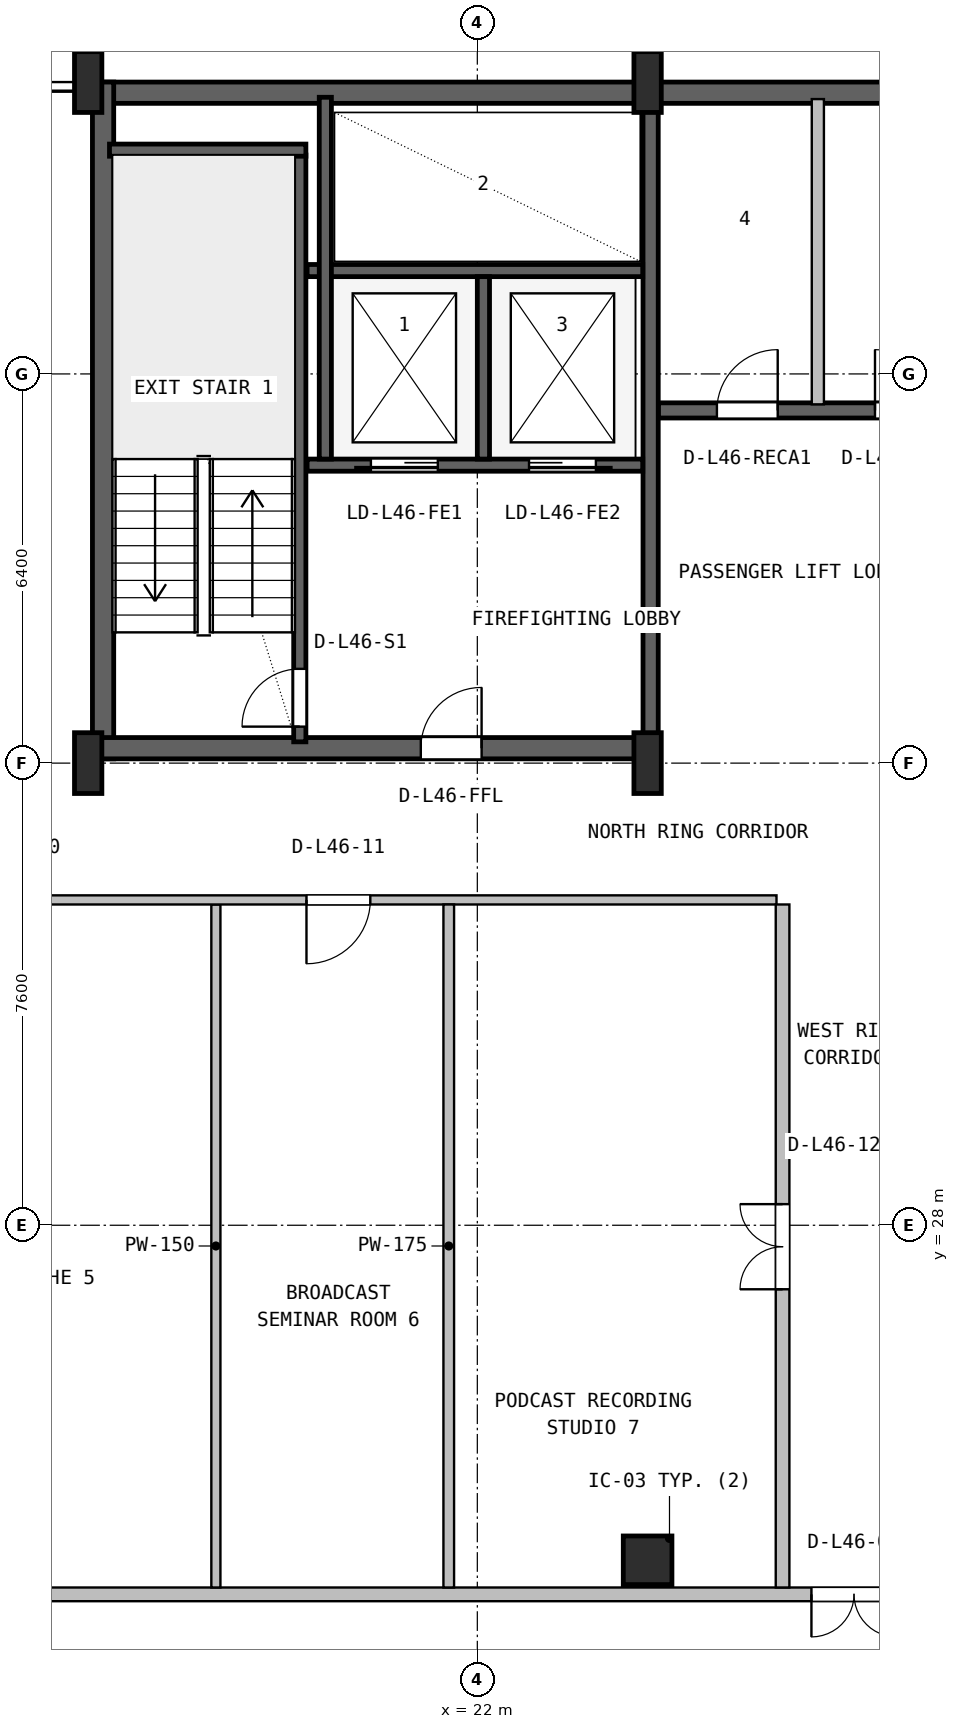
"""IFC4 building model, lengths in metres.
Left out: names, types, materials, properties, quantities, classifications, styles, units other than length and angle.
Written with IfcOpenShell. Run it as: python <this file> out.ifc"""

import sys

from ifc_helpers import new_model, si_unit, direction, frame, frame_2d, origin, origin_2d, place, context, subcontext, project, spatial, rectangle, i_section, extrude, source, transform, mapped, element, fill, save


model = new_model("IFC4")
c1 = context("Model", 3, precision=1e-05, world=origin(), true_north=direction((0.0, 1.0)))
c2 = subcontext(c1, "Body", "Model", "MODEL_VIEW")
j1 = project(units=[si_unit("LENGTHUNIT", "METRE"), si_unit("PLANEANGLEUNIT", "RADIAN")], contexts=[c1])
p1 = place(None, origin())
s1 = spatial("IfcSite", under=j1, at=p1, CompositionType="ELEMENT")
p2 = place(p1, origin())
s2 = spatial("IfcBuilding", under=s1, at=p2, CompositionType="ELEMENT")
p3 = place(p2, frame((0.0, 0.0, 187.6)))
s3 = spatial("IfcBuildingStorey", under=s2, at=p3, CompositionType="ELEMENT", Elevation=187.6)
p4 = place(p3, frame((15.6, 46.625, 0.0), z_axis=(0.0, 0.0, 1.0), x_axis=(1.0, 0.0, 0.0)))
e1 = element("IfcWall", 1, at=p4, inside=s3, PredefinedType="SHEAR", context=c2, shape_type="SweptSolid", body=[
    extrude(rectangle(XDim=36.8, YDim=0.35, at=frame_2d((18.4, 0.0))), origin(), (0.0, 0.0, 1.0), 3.52),
])
p5 = place(p3, frame((15.845, 35.67, 0.0), z_axis=(0.0, 0.0, 1.0), x_axis=(0.0, 1.0, 0.0)))
e2 = element("IfcWall", 2, at=p5, inside=s3, PredefinedType="SHEAR", context=c2, shape_type="SweptSolid", body=[
    extrude(rectangle(XDim=11.13, YDim=0.35, at=frame_2d((5.565, 0.0))), origin(), (0.0, 0.0, 1.0), 3.52),
])
p6 = place(p3, frame((15.67, 35.845, 0.0), z_axis=(0.0, 0.0, 1.0), x_axis=(1.0, 0.0, 0.0)))
e3 = element("IfcWall", 3, at=p6, inside=s3, PredefinedType="SHEAR", context=c2, shape_type="SweptSolid", body=[
    extrude(rectangle(XDim=9.13, YDim=0.35, at=frame_2d((4.565, 0.0))), origin(), (0.0, 0.0, 1.0), 3.52),
])
p7 = place(p6, frame((5.4, 0.0, 0.0)))
e4 = element("IfcOpeningElement", 4, at=p7, cuts=e3, PredefinedType="OPENING", context=c2, shape_type="SweptSolid", body=[
    extrude(rectangle(XDim=1.0, YDim=2.1, at=frame_2d((0.5, 1.05))), frame((0.0, 0.185, 0.0), z_axis=(0.0, -1.0, 0.0), x_axis=(1.0, 0.0, 0.0)), (0.0, 0.0, 1.0), 0.37),
])
m1 = source(origin(), c2, "Body", "SweptSolid", [
    extrude(i_section(OverallWidth=0.45, OverallDepth=1.0, WebThickness=0.016, FlangeThickness=0.03, FilletRadius=0.016, at=origin_2d()), origin(), (0.0, 0.0, 1.0), 3.8),
])
for number, where, z_axis, x_axis in (
    (5, (15.6, 35.6, 0.0), (0.0, 0.0, 1.0), (1.0, 0.0, 0.0)),
    (6, (15.6, 46.8, 0.0), (0.0, 0.0, 1.0), (1.0, 0.0, 0.0)),
    (7, (24.8, 35.6, 0.0), (0.0, 0.0, 1.0), (1.0, 0.0, 0.0)),
    (8, (24.8, 46.8, 0.0), (0.0, 0.0, 1.0), (1.0, 0.0, 0.0)),
):
    element("IfcColumn", number, at=place(p3, frame(where, z_axis=z_axis, x_axis=x_axis)), inside=s3, PredefinedType="COLUMN", context=c2, shape_type="MappedRepresentation", body=[
        mapped(m1, transform((0.0, 0.0, 0.0), x_axis=(1.0, 0.0, 0.0), y_axis=(0.0, 1.0, 0.0), z_axis=(0.0, 0.0, 1.0), scale=1.0)),
    ])
m2 = source(origin(), c2, "Body", "SweptSolid", [
    extrude(rectangle(XDim=0.8, YDim=0.8, at=origin_2d()), origin(), (0.0, 0.0, 1.0), 3.8),
])
p8 = place(p3, frame((24.8, 22.49, 0.0), z_axis=(0.0, 0.0, 1.0), x_axis=(1.0, 0.0, 0.0)))
e9 = element("IfcColumn", 9, at=p8, inside=s3, PredefinedType="COLUMN", context=c2, shape_type="MappedRepresentation", body=[
    mapped(m2, transform((0.0, 0.0, 0.0), x_axis=(1.0, 0.0, 0.0), y_axis=(0.0, 1.0, 0.0), z_axis=(0.0, 0.0, 1.0), scale=1.0)),
])
p9 = place(p3, frame((19.08, 35.95, 0.0), z_axis=(0.0, 0.0, 1.0), x_axis=(0.0, 1.0, 0.0)))
e10 = element("IfcWall", 10, at=p9, inside=s3, PredefinedType="SHEAR", context=c2, shape_type="SweptSolid", body=[
    extrude(rectangle(XDim=9.65, YDim=0.2, at=frame_2d((4.825, 0.0))), origin(), (0.0, 0.0, 1.0), 3.52),
])
p10 = place(p9, frame((0.25, 0.0, 0.0)))
e11 = element("IfcOpeningElement", 11, at=p10, cuts=e10, PredefinedType="OPENING", context=c2, shape_type="SweptSolid", body=[
    extrude(rectangle(XDim=0.95, YDim=2.1, at=frame_2d((0.475, 1.05))), frame((0.0, 0.11, 0.0), z_axis=(0.0, -1.0, 0.0), x_axis=(1.0, 0.0, 0.0)), (0.0, 0.0, 1.0), 0.22),
])
p11 = place(p3, frame((15.95, 45.68, 0.0), z_axis=(0.0, 0.0, 1.0), x_axis=(1.0, 0.0, 0.0)))
e12 = element("IfcWall", 12, at=p11, inside=s3, PredefinedType="SHEAR", context=c2, shape_type="SweptSolid", body=[
    extrude(rectangle(XDim=3.23, YDim=0.2, at=frame_2d((1.615, 0.0))), origin(), (0.0, 0.0, 1.0), 3.52),
])
p12 = place(p3, frame((24.85, 36.05, 0.0), z_axis=(0.0, 0.0, 1.0), x_axis=(0.0, 1.0, 0.0)))
e13 = element("IfcWall", 13, at=p12, inside=s3, PredefinedType="SHEAR", context=c2, shape_type="SweptSolid", body=[
    extrude(rectangle(XDim=10.45, YDim=0.25, at=frame_2d((5.225, 0.0))), origin(), (0.0, 0.0, 1.0), 3.52),
])
p13 = place(p3, frame((19.2, 40.5, 0.0), z_axis=(0.0, 0.0, 1.0), x_axis=(1.0, 0.0, 0.0)))
e14 = element("IfcWall", 14, at=p13, inside=s3, PredefinedType="SHEAR", context=c2, shape_type="SweptSolid", body=[
    extrude(rectangle(XDim=5.52, YDim=0.2, at=frame_2d((2.76, 0.0))), origin(), (0.0, 0.0, 1.0), 3.52),
])
p14 = place(p13, frame((1.05, 0.0, 0.0)))
e15 = element("IfcOpeningElement", 15, at=p14, cuts=e14, PredefinedType="OPENING", context=c2, shape_type="SweptSolid", body=[
    extrude(rectangle(XDim=1.1, YDim=2.18, at=frame_2d((0.55, 1.09))), frame((0.0, 0.11, 0.0), z_axis=(0.0, -1.0, 0.0), x_axis=(1.0, 0.0, 0.0)), (0.0, 0.0, 1.0), 0.22),
])
p15 = place(p13, frame((3.65, 0.0, 0.0)))
e16 = element("IfcOpeningElement", 16, at=p15, cuts=e14, PredefinedType="OPENING", context=c2, shape_type="SweptSolid", body=[
    extrude(rectangle(XDim=1.1, YDim=2.18, at=frame_2d((0.55, 1.09))), frame((0.0, 0.11, 0.0), z_axis=(0.0, -1.0, 0.0), x_axis=(1.0, 0.0, 0.0)), (0.0, 0.0, 1.0), 0.22),
])
p16 = place(p3, frame((19.2, 43.7, 0.0), z_axis=(0.0, 0.0, 1.0), x_axis=(1.0, 0.0, 0.0)))
e17 = element("IfcWall", 17, at=p16, inside=s3, PredefinedType="SHEAR", context=c2, shape_type="SweptSolid", body=[
    extrude(rectangle(XDim=5.52, YDim=0.2, at=frame_2d((2.76, 0.0))), origin(), (0.0, 0.0, 1.0), 3.52),
])
p17 = place(p3, frame((22.1, 40.6, 0.0), z_axis=(0.0, 0.0, 1.0), x_axis=(0.0, 1.0, 0.0)))
e18 = element("IfcWall", 18, at=p17, inside=s3, PredefinedType="SHEAR", context=c2, shape_type="SweptSolid", body=[
    extrude(rectangle(XDim=3.0, YDim=0.2, at=frame_2d((1.5, 0.0))), origin(), (0.0, 0.0, 1.0), 3.52),
])
p18 = place(p3, frame((19.5, 40.6, 0.0), z_axis=(0.0, 0.0, 1.0), x_axis=(0.0, 1.0, 0.0)))
e19 = element("IfcWall", 19, at=p18, inside=s3, PredefinedType="SHEAR", context=c2, shape_type="SweptSolid", body=[
    extrude(rectangle(XDim=5.95, YDim=0.2, at=frame_2d((2.975, 0.0))), origin(), (0.0, 0.0, 1.0), 3.52),
])
p19 = place(p3, frame((24.98, 41.4, 0.0), z_axis=(0.0, 0.0, 1.0), x_axis=(1.0, 0.0, 0.0)))
e20 = element("IfcWall", 20, at=p19, inside=s3, PredefinedType="SHEAR", context=c2, shape_type="SweptSolid", body=[
    extrude(rectangle(XDim=23.82, YDim=0.25, at=frame_2d((11.91, 0.0))), origin(), (0.0, 0.0, 1.0), 3.52),
])
p20 = place(p19, frame((8.87, 0.0, 0.0)))
e21 = element("IfcOpeningElement", 21, at=p20, cuts=e20, PredefinedType="OPENING", context=c2, shape_type="SweptSolid", body=[
    extrude(rectangle(XDim=1.1, YDim=2.18, at=frame_2d((0.55, 1.09))), frame((0.0, 0.135, 0.0), z_axis=(0.0, -1.0, 0.0), x_axis=(1.0, 0.0, 0.0)), (0.0, 0.0, 1.0), 0.27),
])
p21 = place(p19, frame((11.47, 0.0, 0.0)))
e22 = element("IfcOpeningElement", 22, at=p21, cuts=e20, PredefinedType="OPENING", context=c2, shape_type="SweptSolid", body=[
    extrude(rectangle(XDim=1.1, YDim=2.18, at=frame_2d((0.55, 1.09))), frame((0.0, 0.135, 0.0), z_axis=(0.0, -1.0, 0.0), x_axis=(1.0, 0.0, 0.0)), (0.0, 0.0, 1.0), 0.27),
])
p22 = place(p19, frame((14.07, 0.0, 0.0)))
e23 = element("IfcOpeningElement", 23, at=p22, cuts=e20, PredefinedType="OPENING", context=c2, shape_type="SweptSolid", body=[
    extrude(rectangle(XDim=1.1, YDim=2.18, at=frame_2d((0.55, 1.09))), frame((0.0, 0.135, 0.0), z_axis=(0.0, -1.0, 0.0), x_axis=(1.0, 0.0, 0.0)), (0.0, 0.0, 1.0), 0.27),
])
p23 = place(p19, frame((0.96, 0.0, 0.0)))
e24 = element("IfcOpeningElement", 24, at=p23, cuts=e20, PredefinedType="OPENING", context=c2, shape_type="SweptSolid", body=[
    extrude(rectangle(XDim=1.0, YDim=2.08, at=frame_2d((0.5, 1.04))), frame((0.0, 0.135, 0.0), z_axis=(0.0, -1.0, 0.0), x_axis=(1.0, 0.0, 0.0)), (0.0, 0.0, 1.0), 0.27),
])
p24 = place(p19, frame((3.56, 0.0, 0.0)))
e25 = element("IfcOpeningElement", 25, at=p24, cuts=e20, PredefinedType="OPENING", context=c2, shape_type="SweptSolid", body=[
    extrude(rectangle(XDim=1.0, YDim=2.08, at=frame_2d((0.5, 1.04))), frame((0.0, 0.135, 0.0), z_axis=(0.0, -1.0, 0.0), x_axis=(1.0, 0.0, 0.0)), (0.0, 0.0, 1.0), 0.27),
])
p25 = place(p19, frame((6.16, 0.0, 0.0)))
e26 = element("IfcOpeningElement", 26, at=p25, cuts=e20, PredefinedType="OPENING", context=c2, shape_type="SweptSolid", body=[
    extrude(rectangle(XDim=0.92, YDim=2.08, at=frame_2d((0.46, 1.04))), frame((0.0, 0.135, 0.0), z_axis=(0.0, -1.0, 0.0), x_axis=(1.0, 0.0, 0.0)), (0.0, 0.0, 1.0), 0.27),
])
p26 = place(p3, frame((7.18, 21.93, 0.0), z_axis=(0.0, 0.0, 1.0), x_axis=(1.0, 0.0, 0.0)))
e27 = element("IfcWall", 27, at=p26, inside=s3, PredefinedType="PARTITIONING", context=c2, shape_type="SweptSolid", body=[
    extrude(rectangle(XDim=53.64, YDim=0.225, at=frame_2d((26.82, 0.0))), origin(), (0.0, 0.0, 1.0), 2.879),
])
p27 = place(p26, frame((20.315, 0.0, 0.0)))
e28 = element("IfcOpeningElement", 28, at=p27, cuts=e27, PredefinedType="OPENING", context=c2, shape_type="SweptSolid", body=[
    extrude(rectangle(XDim=1.4, YDim=2.12, at=frame_2d((0.7, 1.06))), frame((0.0, 0.123, 0.0), z_axis=(0.0, -1.0, 0.0), x_axis=(1.0, 0.0, 0.0)), (0.0, 0.0, 1.0), 0.245),
])
p28 = place(p26, frame((27.03, 0.0, 0.0)))
e29 = element("IfcOpeningElement", 29, at=p28, cuts=e27, PredefinedType="OPENING", context=c2, shape_type="SweptSolid", body=[
    extrude(rectangle(XDim=1.4, YDim=2.12, at=frame_2d((0.7, 1.06))), frame((0.0, 0.123, 0.0), z_axis=(0.0, -1.0, 0.0), x_axis=(1.0, 0.0, 0.0)), (0.0, 0.0, 1.0), 0.245),
])
p29 = place(p26, frame((34.245, 0.0, 0.0)))
e30 = element("IfcOpeningElement", 30, at=p29, cuts=e27, PredefinedType="OPENING", context=c2, shape_type="SweptSolid", body=[
    extrude(rectangle(XDim=0.92, YDim=2.08, at=frame_2d((0.46, 1.04))), frame((0.0, 0.123, 0.0), z_axis=(0.0, -1.0, 0.0), x_axis=(1.0, 0.0, 0.0)), (0.0, 0.0, 1.0), 0.245),
])
p30 = place(p26, frame((39.455, 0.0, 0.0)))
e31 = element("IfcOpeningElement", 31, at=p30, cuts=e27, PredefinedType="OPENING", context=c2, shape_type="SweptSolid", body=[
    extrude(rectangle(XDim=1.0, YDim=2.1, at=frame_2d((0.5, 1.05))), frame((0.0, 0.123, 0.0), z_axis=(0.0, -1.0, 0.0), x_axis=(1.0, 0.0, 0.0)), (0.0, 0.0, 1.0), 0.245),
])
p31 = place(p3, frame((17.7, 22.043, 0.0), z_axis=(0.0, 0.0, 1.0), x_axis=(0.0, 1.0, 0.0)))
e32 = element("IfcWall", 32, at=p31, inside=s3, PredefinedType="PARTITIONING", context=c2, shape_type="SweptSolid", body=[
    extrude(rectangle(XDim=11.232, YDim=0.15, at=frame_2d((5.616, 0.0))), origin(), (0.0, 0.0, 1.0), 3.192),
])
p32 = place(p3, frame((7.18, 33.35, 0.0), z_axis=(0.0, 0.0, 1.0), x_axis=(1.0, 0.0, 0.0)))
e33 = element("IfcWall", 33, at=p32, inside=s3, PredefinedType="PARTITIONING", context=c2, shape_type="SweptSolid", body=[
    extrude(rectangle(XDim=19.74, YDim=0.15, at=frame_2d((9.87, 0.0))), origin(), (0.0, 0.0, 1.0), 2.879),
])
p33 = place(p32, frame((6.755, 0.0, 0.0)))
e34 = element("IfcOpeningElement", 34, at=p33, cuts=e33, PredefinedType="OPENING", context=c2, shape_type="SweptSolid", body=[
    extrude(rectangle(XDim=0.88, YDim=2.06, at=frame_2d((0.44, 1.03))), frame((0.0, 0.085, 0.0), z_axis=(0.0, -1.0, 0.0), x_axis=(1.0, 0.0, 0.0)), (0.0, 0.0, 1.0), 0.17),
])
p34 = place(p32, frame((12.01, 0.0, 0.0)))
e35 = element("IfcOpeningElement", 35, at=p34, cuts=e33, PredefinedType="OPENING", context=c2, shape_type="SweptSolid", body=[
    extrude(rectangle(XDim=1.05, YDim=2.1, at=frame_2d((0.525, 1.05))), frame((0.0, 0.085, 0.0), z_axis=(0.0, -1.0, 0.0), x_axis=(1.0, 0.0, 0.0)), (0.0, 0.0, 1.0), 0.17),
])
p35 = place(p3, frame((21.53, 22.043, 0.0), z_axis=(0.0, 0.0, 1.0), x_axis=(0.0, 1.0, 0.0)))
e36 = element("IfcWall", 36, at=p35, inside=s3, PredefinedType="PARTITIONING", context=c2, shape_type="SweptSolid", body=[
    extrude(rectangle(XDim=11.232, YDim=0.175, at=frame_2d((5.616, 0.0))), origin(), (0.0, 0.0, 1.0), 3.192),
])
p36 = place(p3, frame((27.02, 22.043, 0.0), z_axis=(0.0, 0.0, 1.0), x_axis=(0.0, 1.0, 0.0)))
e37 = element("IfcWall", 37, at=p36, inside=s3, PredefinedType="PARTITIONING", context=c2, shape_type="SweptSolid", body=[
    extrude(rectangle(XDim=11.232, YDim=0.225, at=frame_2d((5.616, 0.0))), origin(), (0.0, 0.0, 1.0), 2.879),
])
p37 = place(p36, frame((4.904, 0.0, 0.0)))
e38 = element("IfcOpeningElement", 38, at=p37, cuts=e37, PredefinedType="OPENING", context=c2, shape_type="SweptSolid", body=[
    extrude(rectangle(XDim=1.4, YDim=2.12, at=frame_2d((0.7, 1.06))), frame((0.0, 0.123, 0.0), z_axis=(0.0, -1.0, 0.0), x_axis=(1.0, 0.0, 0.0)), (0.0, 0.0, 1.0), 0.245),
])
p38 = place(p3, frame((27.6, 41.5, 0.0), z_axis=(0.0, 0.0, 1.0), x_axis=(0.0, 1.0, 0.0)))
e39 = element("IfcWall", 39, at=p38, inside=s3, PredefinedType="SOLIDWALL", context=c2, shape_type="SweptSolid", body=[
    extrude(rectangle(XDim=5.02, YDim=0.2, at=frame_2d((2.51, 0.0))), origin(), (0.0, 0.0, 1.0), 3.5),
])
m3 = source(origin(), c2, "Body", "SweptSolid", [
    extrude(rectangle(XDim=0.95, YDim=2.1, at=frame_2d((0.475, 1.05))), frame((0.0, 0.025, 0.0), z_axis=(0.0, -1.0, 0.0), x_axis=(1.0, 0.0, 0.0)), (0.0, 0.0, 1.0), 0.05),
])
p39 = place(p10, origin())
e40 = element("IfcDoor", 40, at=p39, inside=s3, OperationType="SINGLE_SWING_LEFT", PredefinedType="DOOR", context=c2, shape_type="MappedRepresentation", body=[
    mapped(m3, transform((0.0, 0.0, 0.0), x_axis=(1.0, 0.0, 0.0), y_axis=(0.0, 1.0, 0.0), z_axis=(0.0, 0.0, 1.0), scale=1.0)),
])
fill(e11, e40)
m4 = source(origin(), c2, "Body", "SweptSolid", [
    extrude(rectangle(XDim=1.0, YDim=2.1, at=frame_2d((0.5, 1.05))), frame((0.0, 0.025, 0.0), z_axis=(0.0, -1.0, 0.0), x_axis=(1.0, 0.0, 0.0)), (0.0, 0.0, 1.0), 0.05),
])
p40 = place(p7, origin())
e41 = element("IfcDoor", 41, at=p40, inside=s3, OperationType="SINGLE_SWING_RIGHT", PredefinedType="DOOR", context=c2, shape_type="MappedRepresentation", body=[
    mapped(m4, transform((0.0, 0.0, 0.0), x_axis=(1.0, 0.0, 0.0), y_axis=(0.0, 1.0, 0.0), z_axis=(0.0, 0.0, 1.0), scale=1.0)),
])
fill(e4, e41)
m5 = source(origin(), c2, "Body", "SweptSolid", [
    extrude(rectangle(XDim=1.1, YDim=2.18, at=frame_2d((0.55, 1.09))), frame((0.0, 0.025, 0.0), z_axis=(0.0, -1.0, 0.0), x_axis=(1.0, 0.0, 0.0)), (0.0, 0.0, 1.0), 0.05),
])
p41 = place(p14, frame((1.1, 0.0, 0.0), z_axis=(0.0, 0.0, 1.0), x_axis=(-1.0, 0.0, 0.0)))
e42 = element("IfcDoor", 42, at=p41, inside=s3, OperationType="SLIDING_TO_LEFT", PredefinedType="DOOR", context=c2, shape_type="MappedRepresentation", body=[
    mapped(m5, transform((0.0, 0.0, 0.0), x_axis=(1.0, 0.0, 0.0), y_axis=(0.0, 1.0, 0.0), z_axis=(0.0, 0.0, 1.0), scale=1.0)),
])
fill(e15, e42)
p42 = place(p15, frame((1.1, 0.0, 0.0), z_axis=(0.0, 0.0, 1.0), x_axis=(-1.0, 0.0, 0.0)))
e43 = element("IfcDoor", 43, at=p42, inside=s3, OperationType="SLIDING_TO_RIGHT", PredefinedType="DOOR", context=c2, shape_type="MappedRepresentation", body=[
    mapped(m5, transform((0.0, 0.0, 0.0), x_axis=(1.0, 0.0, 0.0), y_axis=(0.0, 1.0, 0.0), z_axis=(0.0, 0.0, 1.0), scale=1.0)),
])
fill(e16, e43)
m6 = source(origin(), c2, "Body", "SweptSolid", [
    extrude(rectangle(XDim=1.0, YDim=2.08, at=frame_2d((0.5, 1.04))), frame((0.0, 0.025, 0.0), z_axis=(0.0, -1.0, 0.0), x_axis=(1.0, 0.0, 0.0)), (0.0, 0.0, 1.0), 0.05),
])
p43 = place(p23, origin())
e44 = element("IfcDoor", 44, at=p43, inside=s3, OperationType="SINGLE_SWING_RIGHT", PredefinedType="DOOR", context=c2, shape_type="MappedRepresentation", body=[
    mapped(m6, transform((0.0, 0.0, 0.0), x_axis=(1.0, 0.0, 0.0), y_axis=(0.0, 1.0, 0.0), z_axis=(0.0, 0.0, 1.0), scale=1.0)),
])
fill(e24, e44)
p44 = place(p24, origin())
e45 = element("IfcDoor", 45, at=p44, inside=s3, OperationType="SINGLE_SWING_LEFT", PredefinedType="DOOR", context=c2, shape_type="MappedRepresentation", body=[
    mapped(m6, transform((0.0, 0.0, 0.0), x_axis=(1.0, 0.0, 0.0), y_axis=(0.0, 1.0, 0.0), z_axis=(0.0, 0.0, 1.0), scale=1.0)),
])
fill(e25, e45)
m7 = source(origin(), c2, "Body", "SweptSolid", [
    extrude(rectangle(XDim=1.4, YDim=2.12, at=frame_2d((0.7, 1.06))), frame((0.0, 0.025, 0.0), z_axis=(0.0, -1.0, 0.0), x_axis=(1.0, 0.0, 0.0)), (0.0, 0.0, 1.0), 0.05),
])
p45 = place(p27, frame((1.4, 0.0, 0.0), z_axis=(0.0, 0.0, 1.0), x_axis=(-1.0, 0.0, 0.0)))
e46 = element("IfcDoor", 46, at=p45, inside=s3, OperationType="DOUBLE_DOOR_SINGLE_SWING", PredefinedType="DOOR", context=c2, shape_type="MappedRepresentation", body=[
    mapped(m7, transform((0.0, 0.0, 0.0), x_axis=(1.0, 0.0, 0.0), y_axis=(0.0, 1.0, 0.0), z_axis=(0.0, 0.0, 1.0), scale=1.0)),
])
fill(e28, e46)
m8 = source(origin(), c2, "Body", "SweptSolid", [
    extrude(rectangle(XDim=1.05, YDim=2.1, at=frame_2d((0.525, 1.05))), frame((0.0, 0.025, 0.0), z_axis=(0.0, -1.0, 0.0), x_axis=(1.0, 0.0, 0.0)), (0.0, 0.0, 1.0), 0.05),
])
p46 = place(p34, frame((1.05, 0.0, 0.0), z_axis=(0.0, 0.0, 1.0), x_axis=(-1.0, 0.0, 0.0)))
e47 = element("IfcDoor", 47, at=p46, inside=s3, OperationType="SINGLE_SWING_LEFT", PredefinedType="DOOR", context=c2, shape_type="MappedRepresentation", body=[
    mapped(m8, transform((0.0, 0.0, 0.0), x_axis=(1.0, 0.0, 0.0), y_axis=(0.0, 1.0, 0.0), z_axis=(0.0, 0.0, 1.0), scale=1.0)),
])
fill(e35, e47)
p47 = place(p37, origin())
e48 = element("IfcDoor", 48, at=p47, inside=s3, OperationType="DOUBLE_DOOR_SINGLE_SWING", PredefinedType="DOOR", context=c2, shape_type="MappedRepresentation", body=[
    mapped(m7, transform((0.0, 0.0, 0.0), x_axis=(1.0, 0.0, 0.0), y_axis=(0.0, 1.0, 0.0), z_axis=(0.0, 0.0, 1.0), scale=1.0)),
])
fill(e38, e48)
save(model, sys.argv[1])
